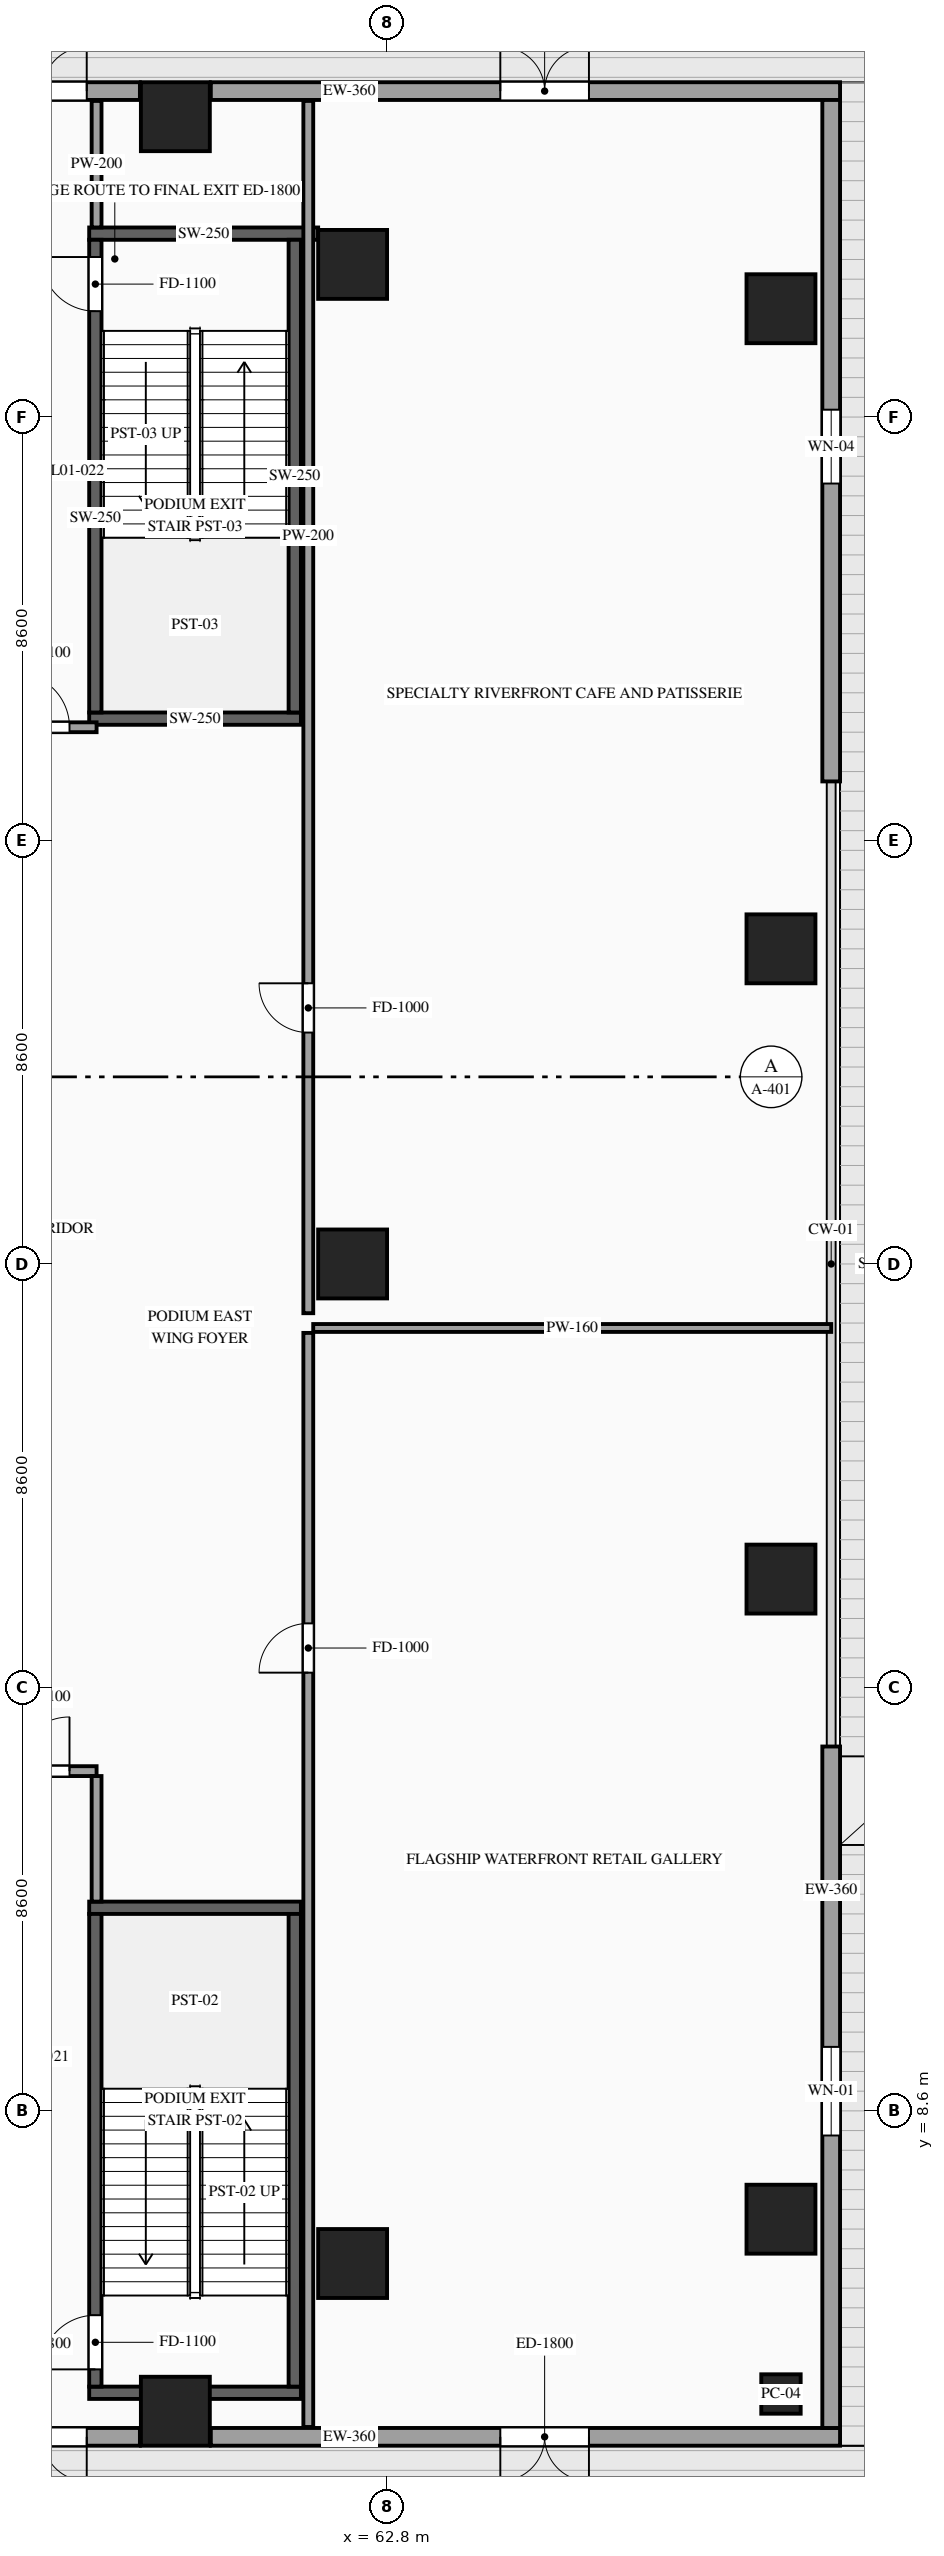
"""IFC4 building model, lengths in metres.
Left out: names, types, materials, properties, quantities, classifications, styles, units other than length and angle.
Written with IfcOpenShell. Run it as: python <this file> out.ifc"""

import sys

from ifc_helpers import new_model, si_unit, direction, frame, frame_2d, origin, origin_2d, place, context, subcontext, project, spatial, rectangle, extrude, source, transform, mapped, element, fill, save


model = new_model("IFC4")
c1 = context("Model", 3, precision=1e-05, world=origin(), true_north=direction((0.0, 1.0)))
c2 = subcontext(c1, "Body", "Model", "MODEL_VIEW")
j1 = project(units=[si_unit("LENGTHUNIT", "METRE"), si_unit("PLANEANGLEUNIT", "RADIAN")], contexts=[c1])
p1 = place(None, origin())
s1 = spatial("IfcSite", under=j1, at=p1, CompositionType="ELEMENT")
p2 = place(p1, origin())
s2 = spatial("IfcBuilding", under=s1, at=p2, CompositionType="ELEMENT")
p3 = place(p2, origin())
s3 = spatial("IfcBuildingStorey", under=s2, at=p3, CompositionType="ELEMENT", Elevation=0.0)
m1 = source(origin(), c2, "Body", "SweptSolid", [
    extrude(rectangle(XDim=0.8, YDim=0.8, at=origin_2d()), origin(), (0.0, 0.0, 1.0), 5.4),
])
p4 = place(p3, frame((70.8, 2.85, 0.0), z_axis=(0.0, 0.0, 1.0), x_axis=(1.0, 0.0, 0.0)))
e1 = element("IfcColumn", 1, at=p4, inside=s3, PredefinedType="COLUMN", context=c2, shape_type="MappedRepresentation", body=[
    mapped(m1, transform((0.0, 0.0, 0.0), scale=1.0)),
])
m2 = source(origin(), c2, "Body", "SweptSolid", [
    extrude(rectangle(XDim=1.4, YDim=1.4, at=origin_2d()), origin(), (0.0, 0.0, 1.0), 5.4),
])
for number, where, z_axis, x_axis in (
    (2, (70.8, 6.4, 0.0), (0.0, 0.0, 1.0), (1.0, 0.0, 0.0)),
    (3, (70.8, 19.4, 0.0), (0.0, 0.0, 1.0), (1.0, 0.0, 0.0)),
    (4, (70.8, 32.2, 0.0), (0.0, 0.0, 1.0), (1.0, 0.0, 0.0)),
    (5, (70.8, 45.2, 0.0), (0.0, 0.0, 1.0), (1.0, 0.0, 0.0)),
    (6, (62.1, 5.5, 0.0), (0.0, 0.0, 1.0), (1.0, 0.0, 0.0)),
    (7, (62.1, 25.8, 0.0), (0.0, 0.0, 1.0), (1.0, 0.0, 0.0)),
    (8, (62.1, 46.1, 0.0), (0.0, 0.0, 1.0), (1.0, 0.0, 0.0)),
    (9, (58.5, 2.5, 0.0), (0.0, 0.0, 1.0), (1.0, 0.0, 0.0)),
    (10, (58.5, 49.1, 0.0), (0.0, 0.0, 1.0), (1.0, 0.0, 0.0)),
):
    element("IfcColumn", number, at=place(p3, frame(where, z_axis=z_axis, x_axis=x_axis)), inside=s3, PredefinedType="COLUMN", context=c2, shape_type="MappedRepresentation", body=[
        mapped(m2, transform((0.0, 0.0, 0.0), scale=1.0)),
    ])
p5 = place(p3, frame((72.0, 1.98, 0.0), z_axis=(0.0, 0.0, 1.0), x_axis=(-1.0, 0.0, 0.0)))
e11 = element("IfcWall", 11, at=p5, inside=s3, PredefinedType="SOLIDWALL", context=c2, shape_type="SweptSolid", body=[
    extrude(rectangle(XDim=12.78, YDim=0.36, at=frame_2d((6.39, 0.0))), origin(), (0.0, 0.0, 1.0), 5.12),
])
p6 = place(p5, frame((5.1, 0.0, 0.0)))
e12 = element("IfcOpeningElement", 12, at=p6, cuts=e11, PredefinedType="OPENING", context=c2, shape_type="SweptSolid", body=[
    extrude(rectangle(XDim=1.8, YDim=2.4, at=frame_2d((0.9, 1.2))), frame((0.0, 0.195, 0.0), z_axis=(0.0, -1.0, 0.0), x_axis=(1.0, 0.0, 0.0)), (0.0, 0.0, 1.0), 0.39),
])
p7 = place(p3, frame((57.78, 1.98, 0.0), z_axis=(0.0, 0.0, 1.0), x_axis=(-1.0, 0.0, 0.0)))
e13 = element("IfcWall", 13, at=p7, inside=s3, PredefinedType="SOLIDWALL", context=c2, shape_type="SweptSolid", body=[
    extrude(rectangle(XDim=11.38, YDim=0.36, at=frame_2d((5.69, 0.0))), origin(), (0.0, 0.0, 1.0), 5.12),
])
p8 = place(p7, frame((7.78, 0.0, 0.0)))
e14 = element("IfcOpeningElement", 14, at=p8, cuts=e13, PredefinedType="OPENING", context=c2, shape_type="SweptSolid", body=[
    extrude(rectangle(XDim=2.4, YDim=2.8, at=frame_2d((1.2, 1.4))), frame((0.0, 0.195, 0.0), z_axis=(0.0, -1.0, 0.0), x_axis=(1.0, 0.0, 0.0)), (0.0, 0.0, 1.0), 0.39),
])
p9 = place(p7, frame((1.08, 0.0, 0.0)))
e15 = element("IfcOpeningElement", 15, at=p9, cuts=e13, PredefinedType="OPENING", context=c2, shape_type="SweptSolid", body=[
    extrude(rectangle(XDim=1.8, YDim=2.4, at=frame_2d((0.9, 1.2))), frame((0.0, 0.195, 0.0), z_axis=(0.0, -1.0, 0.0), x_axis=(1.0, 0.0, 0.0)), (0.0, 0.0, 1.0), 0.39),
])
p10 = place(p3, frame((59.22, 49.62, 0.0), z_axis=(0.0, 0.0, 1.0), x_axis=(1.0, 0.0, 0.0)))
e16 = element("IfcWall", 16, at=p10, inside=s3, PredefinedType="SOLIDWALL", context=c2, shape_type="SweptSolid", body=[
    extrude(rectangle(XDim=12.78, YDim=0.36, at=frame_2d((6.39, 0.0))), origin(), (0.0, 0.0, 1.0), 5.12),
])
p11 = place(p10, frame((5.88, 0.0, 0.0)))
e17 = element("IfcOpeningElement", 17, at=p11, cuts=e16, PredefinedType="OPENING", context=c2, shape_type="SweptSolid", body=[
    extrude(rectangle(XDim=1.8, YDim=2.4, at=frame_2d((0.9, 1.2))), frame((0.0, 0.195, 0.0), z_axis=(0.0, -1.0, 0.0), x_axis=(1.0, 0.0, 0.0)), (0.0, 0.0, 1.0), 0.39),
])
p12 = place(p3, frame((53.2, 49.62, 0.0), z_axis=(0.0, 0.0, 1.0), x_axis=(1.0, 0.0, 0.0)))
e18 = element("IfcWall", 18, at=p12, inside=s3, PredefinedType="SOLIDWALL", context=c2, shape_type="SweptSolid", body=[
    extrude(rectangle(XDim=4.58, YDim=0.36, at=frame_2d((2.29, 0.0))), origin(), (0.0, 0.0, 1.0), 5.12),
])
p13 = place(p12, frame((1.7, 0.0, 0.0)))
e19 = element("IfcOpeningElement", 19, at=p13, cuts=e18, PredefinedType="OPENING", context=c2, shape_type="SweptSolid", body=[
    extrude(rectangle(XDim=1.8, YDim=2.4, at=frame_2d((0.9, 1.2))), frame((0.0, 0.195, 0.0), z_axis=(0.0, -1.0, 0.0), x_axis=(1.0, 0.0, 0.0)), (0.0, 0.0, 1.0), 0.39),
])
p14 = place(p3, frame((71.82, 2.16, 0.0), z_axis=(0.0, 0.0, 1.0), x_axis=(0.0, 1.0, 0.0)))
e20 = element("IfcWall", 20, at=p14, inside=s3, PredefinedType="SOLIDWALL", context=c2, shape_type="SweptSolid", body=[
    extrude(rectangle(XDim=13.84, YDim=0.36, at=frame_2d((6.92, 0.0))), origin(), (0.0, 0.0, 1.0), 5.12),
])
p15 = place(p14, frame((5.94, 0.0, 0.9)))
e21 = element("IfcOpeningElement", 21, at=p15, cuts=e20, PredefinedType="OPENING", context=c2, shape_type="SweptSolid", body=[
    extrude(rectangle(XDim=1.8, YDim=2.2, at=frame_2d((0.9, 1.1))), frame((0.0, 0.195, 0.0), z_axis=(0.0, -1.0, 0.0), x_axis=(1.0, 0.0, 0.0)), (0.0, 0.0, 1.0), 0.39),
])
p16 = place(p3, frame((71.82, 35.6, 0.0), z_axis=(0.0, 0.0, 1.0), x_axis=(0.0, 1.0, 0.0)))
e22 = element("IfcWall", 22, at=p16, inside=s3, PredefinedType="SOLIDWALL", context=c2, shape_type="SweptSolid", body=[
    extrude(rectangle(XDim=13.84, YDim=0.36, at=frame_2d((6.92, 0.0))), origin(), (0.0, 0.0, 1.0), 5.12),
])
p17 = place(p16, frame((6.05, 0.0, 0.9)))
e23 = element("IfcOpeningElement", 23, at=p17, cuts=e22, PredefinedType="OPENING", context=c2, shape_type="SweptSolid", body=[
    extrude(rectangle(XDim=1.5, YDim=1.8, at=frame_2d((0.75, 0.9))), frame((0.0, 0.195, 0.0), z_axis=(0.0, -1.0, 0.0), x_axis=(1.0, 0.0, 0.0)), (0.0, 0.0, 1.0), 0.39),
])
m3 = source(origin(), c2, "Body", "SweptSolid", [
    extrude(rectangle(XDim=4.3, YDim=0.25, at=frame_2d((2.15, 0.0))), origin(), (0.0, 0.0, 1.0), 5.12),
])
for number, where, z_axis, x_axis in (
    (24, (56.75, 2.875, 0.0), (0.0, 0.0, 1.0), (1.0, 0.0, 0.0)),
    (25, (56.75, 12.725, 0.0), (0.0, 0.0, 1.0), (1.0, 0.0, 0.0)),
):
    element("IfcWall", number, at=place(p3, frame(where, z_axis=z_axis, x_axis=x_axis)), inside=s3, PredefinedType="SOLIDWALL", context=c2, shape_type="MappedRepresentation", body=[
        mapped(m3, transform((0.0, 0.0, 0.0), scale=1.0)),
    ])
p18 = place(p3, frame((56.875, 3.0, 0.0), z_axis=(0.0, 0.0, 1.0), x_axis=(0.0, 1.0, 0.0)))
e26 = element("IfcWall", 26, at=p18, inside=s3, PredefinedType="SOLIDWALL", context=c2, shape_type="SweptSolid", body=[
    extrude(rectangle(XDim=9.6, YDim=0.25, at=frame_2d((4.8, 0.0))), origin(), (0.0, 0.0, 1.0), 5.12),
])
p19 = place(p18, frame((0.35, 0.0, 0.0)))
e27 = element("IfcOpeningElement", 27, at=p19, cuts=e26, PredefinedType="OPENING", context=c2, shape_type="SweptSolid", body=[
    extrude(rectangle(XDim=1.1, YDim=2.2, at=frame_2d((0.55, 1.1))), frame((0.0, 0.14, 0.0), z_axis=(0.0, -1.0, 0.0), x_axis=(1.0, 0.0, 0.0)), (0.0, 0.0, 1.0), 0.28),
])
m4 = source(origin(), c2, "Body", "SweptSolid", [
    extrude(rectangle(XDim=9.6, YDim=0.25, at=frame_2d((4.8, 0.0))), origin(), (0.0, 0.0, 1.0), 5.12),
])
p20 = place(p3, frame((60.925, 3.0, 0.0), z_axis=(0.0, 0.0, 1.0), x_axis=(0.0, 1.0, 0.0)))
e28 = element("IfcWall", 28, at=p20, inside=s3, PredefinedType="SOLIDWALL", context=c2, shape_type="MappedRepresentation", body=[
    mapped(m4, transform((0.0, 0.0, 0.0), scale=1.0)),
])
p21 = place(p3, frame((56.75, 36.875, 0.0), z_axis=(0.0, 0.0, 1.0), x_axis=(1.0, 0.0, 0.0)))
e29 = element("IfcWall", 29, at=p21, inside=s3, PredefinedType="SOLIDWALL", context=c2, shape_type="MappedRepresentation", body=[
    mapped(m3, transform((0.0, 0.0, 0.0), scale=1.0)),
])
m5 = source(origin(), c2, "Body", "SweptSolid", [
    extrude(rectangle(XDim=4.65, YDim=0.25, at=frame_2d((2.325, 0.0))), origin(), (0.0, 0.0, 1.0), 5.12),
])
p22 = place(p3, frame((56.75, 46.725, 0.0), z_axis=(0.0, 0.0, 1.0), x_axis=(1.0, 0.0, 0.0)))
e30 = element("IfcWall", 30, at=p22, inside=s3, PredefinedType="SOLIDWALL", context=c2, shape_type="MappedRepresentation", body=[
    mapped(m5, transform((0.0, 0.0, 0.0), scale=1.0)),
])
p23 = place(p3, frame((56.875, 37.0, 0.0), z_axis=(0.0, 0.0, 1.0), x_axis=(0.0, 1.0, 0.0)))
e31 = element("IfcWall", 31, at=p23, inside=s3, PredefinedType="SOLIDWALL", context=c2, shape_type="SweptSolid", body=[
    extrude(rectangle(XDim=9.6, YDim=0.25, at=frame_2d((4.8, 0.0))), origin(), (0.0, 0.0, 1.0), 5.12),
])
p24 = place(p23, frame((8.15, 0.0, 0.0)))
e32 = element("IfcOpeningElement", 32, at=p24, cuts=e31, PredefinedType="OPENING", context=c2, shape_type="SweptSolid", body=[
    extrude(rectangle(XDim=1.1, YDim=2.2, at=frame_2d((0.55, 1.1))), frame((0.0, 0.14, 0.0), z_axis=(0.0, -1.0, 0.0), x_axis=(1.0, 0.0, 0.0)), (0.0, 0.0, 1.0), 0.28),
])
p25 = place(p3, frame((60.925, 37.0, 0.0), z_axis=(0.0, 0.0, 1.0), x_axis=(0.0, 1.0, 0.0)))
e33 = element("IfcWall", 33, at=p25, inside=s3, PredefinedType="SOLIDWALL", context=c2, shape_type="MappedRepresentation", body=[
    mapped(m4, transform((0.0, 0.0, 0.0), scale=1.0)),
])
p26 = place(p3, frame((54.65, 15.5, 0.0), z_axis=(0.0, 0.0, 1.0), x_axis=(1.0, 0.0, 0.0)))
e34 = element("IfcWall", 34, at=p26, inside=s3, PredefinedType="PARTITIONING", context=c2, shape_type="SweptSolid", body=[
    extrude(rectangle(XDim=2.25, YDim=0.2, at=frame_2d((1.125, 0.0))), origin(), (0.0, 0.0, 1.0), 5.12),
])
p27 = place(p26, frame((0.6, 0.0, 0.0)))
e35 = element("IfcOpeningElement", 35, at=p27, cuts=e34, PredefinedType="OPENING", context=c2, shape_type="SweptSolid", body=[
    extrude(rectangle(XDim=1.1, YDim=2.2, at=frame_2d((0.55, 1.1))), frame((0.0, 0.115, 0.0), z_axis=(0.0, -1.0, 0.0), x_axis=(1.0, 0.0, 0.0)), (0.0, 0.0, 1.0), 0.23),
])
m6 = source(origin(), c2, "Body", "SweptSolid", [
    extrude(rectangle(XDim=2.55, YDim=0.2, at=frame_2d((1.275, 0.0))), origin(), (0.0, 0.0, 1.0), 5.12),
])
p28 = place(p3, frame((56.9, 12.85, 0.0), z_axis=(0.0, 0.0, 1.0), x_axis=(0.0, 1.0, 0.0)))
e36 = element("IfcWall", 36, at=p28, inside=s3, PredefinedType="PARTITIONING", context=c2, shape_type="MappedRepresentation", body=[
    mapped(m6, transform((0.0, 0.0, 0.0), scale=1.0)),
])
p29 = place(p3, frame((54.65, 36.7, 0.0), z_axis=(0.0, 0.0, 1.0), x_axis=(1.0, 0.0, 0.0)))
e37 = element("IfcWall", 37, at=p29, inside=s3, PredefinedType="PARTITIONING", context=c2, shape_type="SweptSolid", body=[
    extrude(rectangle(XDim=2.25, YDim=0.2, at=frame_2d((1.125, 0.0))), origin(), (0.0, 0.0, 1.0), 5.12),
])
p30 = place(p29, frame((0.6, 0.0, 0.0)))
e38 = element("IfcOpeningElement", 38, at=p30, cuts=e37, PredefinedType="OPENING", context=c2, shape_type="SweptSolid", body=[
    extrude(rectangle(XDim=1.1, YDim=2.2, at=frame_2d((0.55, 1.1))), frame((0.0, 0.115, 0.0), z_axis=(0.0, -1.0, 0.0), x_axis=(1.0, 0.0, 0.0)), (0.0, 0.0, 1.0), 0.23),
])
m7 = source(origin(), c2, "Body", "SweptSolid", [
    extrude(rectangle(XDim=2.57, YDim=0.2, at=frame_2d((1.285, 0.0))), origin(), (0.0, 0.0, 1.0), 5.12),
])
p31 = place(p3, frame((56.9, 46.85, 0.0), z_axis=(0.0, 0.0, 1.0), x_axis=(0.0, 1.0, 0.0)))
e39 = element("IfcWall", 39, at=p31, inside=s3, PredefinedType="PARTITIONING", context=c2, shape_type="MappedRepresentation", body=[
    mapped(m7, transform((0.0, 0.0, 0.0), scale=1.0)),
])
p32 = place(p3, frame((61.2, 2.18, 0.0), z_axis=(0.0, 0.0, 1.0), x_axis=(0.0, 1.0, 0.0)))
e40 = element("IfcWall", 40, at=p32, inside=s3, PredefinedType="PARTITIONING", context=c2, shape_type="SweptSolid", body=[
    extrude(rectangle(XDim=22.22, YDim=0.2, at=frame_2d((11.11, 0.0))), origin(), (0.0, 0.0, 1.0), 5.12),
])
p33 = place(p32, frame((15.32, 0.0, 0.0)))
e41 = element("IfcOpeningElement", 41, at=p33, cuts=e40, PredefinedType="OPENING", context=c2, shape_type="SweptSolid", body=[
    extrude(rectangle(XDim=1.0, YDim=2.2, at=frame_2d((0.5, 1.1))), frame((0.0, 0.115, 0.0), z_axis=(0.0, -1.0, 0.0), x_axis=(1.0, 0.0, 0.0)), (0.0, 0.0, 1.0), 0.23),
])
m8 = source(origin(), c2, "Body", "SweptSolid", [
    extrude(rectangle(XDim=10.52, YDim=0.16, at=frame_2d((5.26, 0.0))), origin(), (0.0, 0.0, 1.0), 5.12),
])
p34 = place(p3, frame((61.3, 24.5, 0.0), z_axis=(0.0, 0.0, 1.0), x_axis=(1.0, 0.0, 0.0)))
e42 = element("IfcWall", 42, at=p34, inside=s3, PredefinedType="PARTITIONING", context=c2, shape_type="MappedRepresentation", body=[
    mapped(m8, transform((0.0, 0.0, 0.0), scale=1.0)),
])
p35 = place(p3, frame((61.2, 24.8, 0.0), z_axis=(0.0, 0.0, 1.0), x_axis=(0.0, 1.0, 0.0)))
e43 = element("IfcWall", 43, at=p35, inside=s3, PredefinedType="PARTITIONING", context=c2, shape_type="SweptSolid", body=[
    extrude(rectangle(XDim=24.62, YDim=0.2, at=frame_2d((12.31, 0.0))), origin(), (0.0, 0.0, 1.0), 5.12),
])
p36 = place(p35, frame((5.7, 0.0, 0.0)))
e44 = element("IfcOpeningElement", 44, at=p36, cuts=e43, PredefinedType="OPENING", context=c2, shape_type="SweptSolid", body=[
    extrude(rectangle(XDim=1.0, YDim=2.2, at=frame_2d((0.5, 1.1))), frame((0.0, 0.115, 0.0), z_axis=(0.0, -1.0, 0.0), x_axis=(1.0, 0.0, 0.0)), (0.0, 0.0, 1.0), 0.23),
])
m9 = source(origin(), c2, "Body", "SweptSolid", [
    extrude(rectangle(XDim=1.8, YDim=2.4, at=frame_2d((0.9, 1.2))), frame((0.0, 0.025, 0.0), z_axis=(0.0, -1.0, 0.0), x_axis=(1.0, 0.0, 0.0)), (0.0, 0.0, 1.0), 0.05),
])
p37 = place(p6, origin())
e45 = element("IfcDoor", 45, at=p37, inside=s3, OperationType="DOUBLE_DOOR_SINGLE_SWING", PredefinedType="DOOR", context=c2, shape_type="MappedRepresentation", body=[
    mapped(m9, transform((0.0, 0.0, 0.0), scale=1.0)),
])
fill(e12, e45)
p38 = place(p9, origin())
e46 = element("IfcDoor", 46, at=p38, inside=s3, OperationType="DOUBLE_DOOR_SINGLE_SWING", PredefinedType="DOOR", context=c2, shape_type="MappedRepresentation", body=[
    mapped(m9, transform((0.0, 0.0, 0.0), scale=1.0)),
])
fill(e15, e46)
p39 = place(p11, origin())
e47 = element("IfcDoor", 47, at=p39, inside=s3, OperationType="DOUBLE_DOOR_SINGLE_SWING", PredefinedType="DOOR", context=c2, shape_type="MappedRepresentation", body=[
    mapped(m9, transform((0.0, 0.0, 0.0), scale=1.0)),
])
fill(e17, e47)
p40 = place(p13, origin())
e48 = element("IfcDoor", 48, at=p40, inside=s3, OperationType="DOUBLE_DOOR_SINGLE_SWING", PredefinedType="DOOR", context=c2, shape_type="MappedRepresentation", body=[
    mapped(m9, transform((0.0, 0.0, 0.0), scale=1.0)),
])
fill(e19, e48)
m10 = source(origin(), c2, "Body", "SweptSolid", [
    extrude(rectangle(XDim=1.8, YDim=2.2, at=frame_2d((0.9, 1.1))), frame((0.0, 0.03, 0.0), z_axis=(0.0, -1.0, 0.0), x_axis=(1.0, 0.0, 0.0)), (0.0, 0.0, 1.0), 0.06),
])
p41 = place(p15, origin())
e49 = element("IfcWindow", 49, at=p41, inside=s3, PartitioningType="SINGLE_PANEL", PredefinedType="WINDOW", context=c2, shape_type="MappedRepresentation", body=[
    mapped(m10, transform((0.0, 0.0, 0.0), scale=1.0)),
])
fill(e21, e49)
m11 = source(origin(), c2, "Body", "SweptSolid", [
    extrude(rectangle(XDim=1.5, YDim=1.8, at=frame_2d((0.75, 0.9))), frame((0.0, 0.03, 0.0), z_axis=(0.0, -1.0, 0.0), x_axis=(1.0, 0.0, 0.0)), (0.0, 0.0, 1.0), 0.06),
])
p42 = place(p17, origin())
e50 = element("IfcWindow", 50, at=p42, inside=s3, PartitioningType="SINGLE_PANEL", PredefinedType="WINDOW", context=c2, shape_type="MappedRepresentation", body=[
    mapped(m11, transform((0.0, 0.0, 0.0), scale=1.0)),
])
fill(e23, e50)
m12 = source(origin(), c2, "Body", "SweptSolid", [
    extrude(rectangle(XDim=1.1, YDim=2.2, at=frame_2d((0.55, 1.1))), frame((0.0, 0.025, 0.0), z_axis=(0.0, -1.0, 0.0), x_axis=(1.0, 0.0, 0.0)), (0.0, 0.0, 1.0), 0.05),
])
p43 = place(p19, origin())
e51 = element("IfcDoor", 51, at=p43, inside=s3, OperationType="SINGLE_SWING_LEFT", PredefinedType="DOOR", context=c2, shape_type="MappedRepresentation", body=[
    mapped(m12, transform((0.0, 0.0, 0.0), scale=1.0)),
])
fill(e27, e51)
p44 = place(p24, origin())
e52 = element("IfcDoor", 52, at=p44, inside=s3, OperationType="SINGLE_SWING_RIGHT", PredefinedType="DOOR", context=c2, shape_type="MappedRepresentation", body=[
    mapped(m12, transform((0.0, 0.0, 0.0), scale=1.0)),
])
fill(e32, e52)
p45 = place(p27, origin())
e53 = element("IfcDoor", 53, at=p45, inside=s3, OperationType="SINGLE_SWING_RIGHT", PredefinedType="DOOR", context=c2, shape_type="MappedRepresentation", body=[
    mapped(m12, transform((0.0, 0.0, 0.0), scale=1.0)),
])
fill(e35, e53)
p46 = place(p30, origin())
e54 = element("IfcDoor", 54, at=p46, inside=s3, OperationType="SINGLE_SWING_LEFT", PredefinedType="DOOR", context=c2, shape_type="MappedRepresentation", body=[
    mapped(m12, transform((0.0, 0.0, 0.0), scale=1.0)),
])
fill(e38, e54)
m13 = source(origin(), c2, "Body", "SweptSolid", [
    extrude(rectangle(XDim=1.0, YDim=2.2, at=frame_2d((0.5, 1.1))), frame((0.0, 0.025, 0.0), z_axis=(0.0, -1.0, 0.0), x_axis=(1.0, 0.0, 0.0)), (0.0, 0.0, 1.0), 0.05),
])
p47 = place(p33, origin())
e55 = element("IfcDoor", 55, at=p47, inside=s3, OperationType="SINGLE_SWING_LEFT", PredefinedType="DOOR", context=c2, shape_type="MappedRepresentation", body=[
    mapped(m13, transform((0.0, 0.0, 0.0), scale=1.0)),
])
fill(e41, e55)
p48 = place(p36, origin())
e56 = element("IfcDoor", 56, at=p48, inside=s3, OperationType="SINGLE_SWING_RIGHT", PredefinedType="DOOR", context=c2, shape_type="MappedRepresentation", body=[
    mapped(m13, transform((0.0, 0.0, 0.0), scale=1.0)),
])
fill(e44, e56)
save(model, sys.argv[1])
